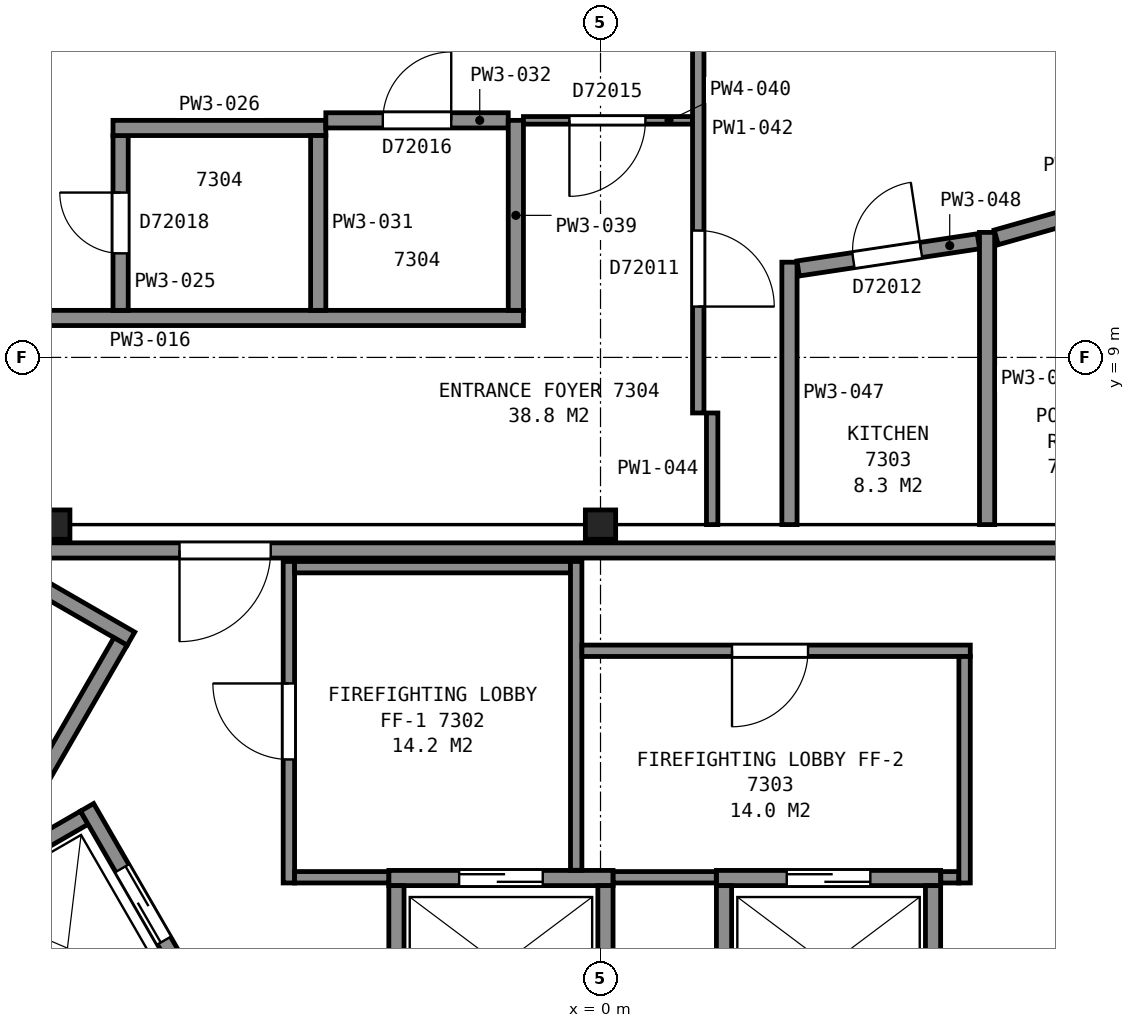
"""IFC4 building model, lengths in metres.
Left out: names, types, materials, properties, quantities, classifications, styles, units other than length and angle.
Written with IfcOpenShell. Run it as: python <this file> out.ifc"""

import sys

from ifc_helpers import new_model, si_unit, direction, frame, frame_2d, origin, origin_2d, place, context, subcontext, project, spatial, rectangle, i_section, extrude, element, fill, save


model = new_model("IFC4")
c1 = context("Model", 3, precision=1e-05, world=origin(), true_north=direction((0.0, 1.0)))
c2 = subcontext(c1, "Body", "Model", "MODEL_VIEW")
j1 = project(units=[si_unit("LENGTHUNIT", "METRE"), si_unit("PLANEANGLEUNIT", "RADIAN")], contexts=[c1])
p1 = place(None, origin())
s1 = spatial("IfcSite", under=j1, at=p1, CompositionType="ELEMENT")
p2 = place(p1, origin())
s2 = spatial("IfcBuilding", under=s1, at=p2, CompositionType="ELEMENT")
p3 = place(p2, frame((0.0, 0.0, 289.9)))
s3 = spatial("IfcBuildingStorey", under=s2, at=p3, CompositionType="ELEMENT", Elevation=289.9)
for number, where, z_axis, x_axis in (
    (1, (0.0, 6.8, 0.0), (0.0, 0.0, 1.0), (1.0, 0.0, 0.0)),
    (2, (-7.18, 6.8, 0.0), (0.0, 0.0, 1.0), (1.0, 0.0, 0.0)),
):
    element("IfcColumn", number, at=place(p3, frame(where, z_axis=z_axis, x_axis=x_axis)), inside=s3, PredefinedType="COLUMN", context=c2, shape_type="SweptSolid", body=[
        extrude(i_section(OverallWidth=0.399, OverallDepth=0.386, WebThickness=0.021, FlangeThickness=0.033, FilletRadius=0.015, at=origin_2d()), origin(), (0.0, 0.0, 1.0), 3.7),
    ])
p4 = place(p3, frame((-6.178, 5.299, 0.0), z_axis=(0.0, 0.0, 1.0), x_axis=(-0.866033125095, 0.499986626058, 0.0)))
e3 = element("IfcWall", 3, at=p4, inside=s3, PredefinedType="PARTITIONING", context=c2, shape_type="SweptSolid", body=[
    extrude(rectangle(XDim=7.2, YDim=0.2, at=frame_2d((3.6, 0.0))), origin(), (0.0, 0.0, 1.0), 3.45),
])
p5 = place(p3, frame((-6.315, 5.262, 0.0), z_axis=(0.0, 0.0, 1.0), x_axis=(-0.500049511043, -0.865996816683, 0.0)))
e4 = element("IfcWall", 4, at=p5, inside=s3, PredefinedType="PARTITIONING", context=c2, shape_type="SweptSolid", body=[
    extrude(rectangle(XDim=2.8, YDim=0.2, at=frame_2d((1.4, 0.0))), origin(), (0.0, 0.0, 1.0), 3.45),
])
p6 = place(p3, frame((-2.785, 2.15, 0.0), z_axis=(0.0, 0.0, 1.0), x_axis=(1.0, 0.0, 0.0)))
e5 = element("IfcWall", 5, at=p6, inside=s3, PredefinedType="PARTITIONING", context=c2, shape_type="SweptSolid", body=[
    extrude(rectangle(XDim=2.95, YDim=0.2, at=frame_2d((1.475, 0.0))), origin(), (0.0, 0.0, 1.0), 3.7),
])
p7 = place(p6, frame((0.925, 0.0, 0.0)))
e6 = element("IfcOpeningElement", 6, at=p7, cuts=e5, PredefinedType="OPENING", context=c2, shape_type="SweptSolid", body=[
    extrude(rectangle(XDim=1.1, YDim=2.1, at=frame_2d((0.55, 1.05))), frame((0.0, 0.11, 0.0), z_axis=(0.0, -1.0, 0.0), x_axis=(1.0, 0.0, 0.0)), (0.0, 0.0, 1.0), 0.22),
])
p8 = place(p3, frame((1.525, 2.15, 0.0), z_axis=(0.0, 0.0, 1.0), x_axis=(1.0, 0.0, 0.0)))
e7 = element("IfcWall", 7, at=p8, inside=s3, PredefinedType="PARTITIONING", context=c2, shape_type="SweptSolid", body=[
    extrude(rectangle(XDim=2.95, YDim=0.2, at=frame_2d((1.475, 0.0))), origin(), (0.0, 0.0, 1.0), 3.7),
])
p9 = place(p8, frame((0.925, 0.0, 0.0)))
e8 = element("IfcOpeningElement", 8, at=p9, cuts=e7, PredefinedType="OPENING", context=c2, shape_type="SweptSolid", body=[
    extrude(rectangle(XDim=1.1, YDim=2.1, at=frame_2d((0.55, 1.05))), frame((0.0, 0.11, 0.0), z_axis=(0.0, -1.0, 0.0), x_axis=(1.0, 0.0, 0.0)), (0.0, 0.0, 1.0), 0.22),
])
for number, where, z_axis, x_axis in (
    (9, (-8.48, 1.969, 0.0), (0.0, 0.0, 1.0), (0.866, 0.5, 0.0)),
    (10, (4.375, 0.1, 0.0), (0.0, 0.0, 1.0), (0.0, 1.0, 0.0)),
    (11, (1.625, 0.1, 0.0), (0.0, 0.0, 1.0), (0.0, 1.0, 0.0)),
    (12, (0.065, 0.1, 0.0), (0.0, 0.0, 1.0), (0.0, 1.0, 0.0)),
    (13, (-2.685, 0.1, 0.0), (0.0, 0.0, 1.0), (0.0, 1.0, 0.0)),
):
    element("IfcWall", number, at=place(p3, frame(where, z_axis=z_axis, x_axis=x_axis)), inside=s3, PredefinedType="PARTITIONING", context=c2, shape_type="SweptSolid", body=[
        extrude(rectangle(XDim=1.95, YDim=0.2, at=frame_2d((0.975, 0.0))), origin(), (0.0, 0.0, 1.0), 3.7),
    ])
p10 = place(p3, frame((-5.28, 0.525, 0.0), z_axis=(0.0, 0.0, 1.0), x_axis=(-0.500037662692, 0.866003658127, 0.0)))
e14 = element("IfcWall", 14, at=p10, inside=s3, PredefinedType="PARTITIONING", context=c2, shape_type="SweptSolid", body=[
    extrude(rectangle(XDim=2.95, YDim=0.2, at=frame_2d((1.475, 0.0))), origin(), (0.0, 0.0, 1.0), 3.7),
])
p11 = place(p10, frame((0.925, 0.0, 0.0)))
e15 = element("IfcOpeningElement", 15, at=p11, cuts=e14, PredefinedType="OPENING", context=c2, shape_type="SweptSolid", body=[
    extrude(rectangle(XDim=1.1, YDim=2.1, at=frame_2d((0.55, 1.05))), frame((0.0, 0.11, 0.0), z_axis=(0.0, -1.0, 0.0), x_axis=(1.0, 0.0, 0.0)), (0.0, 0.0, 1.0), 0.22),
])
p12 = place(p3, frame((-7.142, -0.55, 0.0), z_axis=(0.0, 0.0, 1.0), x_axis=(-0.49997559174, 0.866039495442, 0.0)))
e16 = element("IfcWall", 16, at=p12, inside=s3, PredefinedType="PARTITIONING", context=c2, shape_type="SweptSolid", body=[
    extrude(rectangle(XDim=2.95, YDim=0.2, at=frame_2d((1.475, 0.0))), origin(), (0.0, 0.0, 1.0), 3.7),
])
p13 = place(p3, frame((7.829, 6.46, 0.0), z_axis=(0.0, 0.0, 1.0), x_axis=(-1.0, 0.0, 0.0)))
e17 = element("IfcWall", 17, at=p13, inside=s3, PredefinedType="PARTITIONING", context=c2, shape_type="SweptSolid", body=[
    extrude(rectangle(XDim=15.658, YDim=0.2, at=frame_2d((7.829, 0.0))), origin(), (0.0, 0.0, 1.0), 3.45),
])
p14 = place(p13, frame((12.168, 0.0, 0.0)))
e18 = element("IfcOpeningElement", 18, at=p14, cuts=e17, PredefinedType="OPENING", context=c2, shape_type="SweptSolid", body=[
    extrude(rectangle(XDim=1.2, YDim=2.1, at=frame_2d((0.6, 1.05))), frame((0.0, 0.11, 0.0), z_axis=(0.0, -1.0, 0.0), x_axis=(1.0, 0.0, 0.0)), (0.0, 0.0, 1.0), 0.22),
])
p15 = place(p3, frame((-4.1, 2.085, 0.0), z_axis=(0.0, 0.0, 1.0), x_axis=(0.0, 1.0, 0.0)))
e19 = element("IfcWall", 19, at=p15, inside=s3, PredefinedType="PARTITIONING", context=c2, shape_type="SweptSolid", body=[
    extrude(rectangle(XDim=4.23, YDim=0.15, at=frame_2d((2.115, 0.0))), origin(), (0.0, 0.0, 1.0), 3.45),
])
p16 = place(p15, frame((1.625, 0.0, 0.0)))
e20 = element("IfcOpeningElement", 20, at=p16, cuts=e19, PredefinedType="OPENING", context=c2, shape_type="SweptSolid", body=[
    extrude(rectangle(XDim=1.0, YDim=2.1, at=frame_2d((0.5, 1.05))), frame((0.0, 0.085, 0.0), z_axis=(0.0, -1.0, 0.0), x_axis=(1.0, 0.0, 0.0)), (0.0, 0.0, 1.0), 0.17),
])
p17 = place(p3, frame((-4.025, 2.16, 0.0), z_axis=(0.0, 0.0, 1.0), x_axis=(1.0, 0.0, 0.0)))
e21 = element("IfcWall", 21, at=p17, inside=s3, PredefinedType="PARTITIONING", context=c2, shape_type="SweptSolid", body=[
    extrude(rectangle(XDim=1.238, YDim=0.15, at=frame_2d((0.619, 0.0))), origin(), (0.0, 0.0, 1.0), 3.45),
])
p18 = place(p3, frame((-4.025, 6.24, 0.0), z_axis=(0.0, 0.0, 1.0), x_axis=(1.0, 0.0, 0.0)))
e22 = element("IfcWall", 22, at=p18, inside=s3, PredefinedType="PARTITIONING", context=c2, shape_type="SweptSolid", body=[
    extrude(rectangle(XDim=3.63, YDim=0.15, at=frame_2d((1.815, 0.0))), origin(), (0.0, 0.0, 1.0), 3.45),
])
p19 = place(p3, frame((-0.32, 2.252, 0.0), z_axis=(0.0, 0.0, 1.0), x_axis=(0.0, 1.0, 0.0)))
e23 = element("IfcWall", 23, at=p19, inside=s3, PredefinedType="PARTITIONING", context=c2, shape_type="SweptSolid", body=[
    extrude(rectangle(XDim=4.063, YDim=0.15, at=frame_2d((2.031, 0.0))), origin(), (0.0, 0.0, 1.0), 3.45),
])
p20 = place(p3, frame((-0.245, 5.14, 0.0), z_axis=(0.0, 0.0, 1.0), x_axis=(1.0, 0.0, 0.0)))
e24 = element("IfcWall", 24, at=p20, inside=s3, PredefinedType="PARTITIONING", context=c2, shape_type="SweptSolid", body=[
    extrude(rectangle(XDim=5.11, YDim=0.15, at=frame_2d((2.555, 0.0))), origin(), (0.0, 0.0, 1.0), 3.45),
])
p21 = place(p20, frame((1.975, 0.0, 0.0)))
e25 = element("IfcOpeningElement", 25, at=p21, cuts=e24, PredefinedType="OPENING", context=c2, shape_type="SweptSolid", body=[
    extrude(rectangle(XDim=1.0, YDim=2.1, at=frame_2d((0.5, 1.05))), frame((0.0, 0.085, 0.0), z_axis=(0.0, -1.0, 0.0), x_axis=(1.0, 0.0, 0.0)), (0.0, 0.0, 1.0), 0.17),
])
p22 = place(p3, frame((0.167, 2.16, 0.0), z_axis=(0.0, 0.0, 1.0), x_axis=(1.0, 0.0, 0.0)))
e26 = element("IfcWall", 26, at=p22, inside=s3, PredefinedType="PARTITIONING", context=c2, shape_type="SweptSolid", body=[
    extrude(rectangle(XDim=1.356, YDim=0.15, at=frame_2d((0.678, 0.0))), origin(), (0.0, 0.0, 1.0), 3.45),
])
p23 = place(p3, frame((3.828, -6.29, 0.0), z_axis=(0.0, 0.0, 1.0), x_axis=(0.499979739078, 0.866037101117, 0.0)))
e27 = element("IfcWall", 27, at=p23, inside=s3, PredefinedType="PARTITIONING", context=c2, shape_type="SweptSolid", body=[
    extrude(rectangle(XDim=11.363, YDim=0.2, at=frame_2d((5.681, 0.0))), origin(), (0.0, 0.0, 1.0), 3.45),
])
p24 = place(p23, frame((0.55, 0.0, 0.0)))
e28 = element("IfcOpeningElement", 28, at=p24, cuts=e27, PredefinedType="OPENING", context=c2, shape_type="SweptSolid", body=[
    extrude(rectangle(XDim=1.2, YDim=2.1, at=frame_2d((0.6, 1.05))), frame((0.0, 0.11, 0.0), z_axis=(0.0, -1.0, 0.0), x_axis=(1.0, 0.0, 0.0)), (0.0, 0.0, 1.0), 0.22),
])
p25 = place(p3, frame((4.477, 2.16, 0.0), z_axis=(0.0, 0.0, 1.0), x_axis=(1.0, 0.0, 0.0)))
e29 = element("IfcWall", 29, at=p25, inside=s3, PredefinedType="PARTITIONING", context=c2, shape_type="SweptSolid", body=[
    extrude(rectangle(XDim=0.238, YDim=0.15, at=frame_2d((0.119, 0.0))), origin(), (0.0, 0.0, 1.0), 3.45),
])
p26 = place(p3, frame((4.79, 2.085, 0.0), z_axis=(0.0, 0.0, 1.0), x_axis=(0.0, 1.0, 0.0)))
e30 = element("IfcWall", 30, at=p26, inside=s3, PredefinedType="PARTITIONING", context=c2, shape_type="SweptSolid", body=[
    extrude(rectangle(XDim=2.98, YDim=0.15, at=frame_2d((1.49, 0.0))), origin(), (0.0, 0.0, 1.0), 3.45),
])
p27 = place(p3, frame((-10.838, 9.519, 0.0), z_axis=(0.0, 0.0, 1.0), x_axis=(1.0, 0.0, 0.0)))
e31 = element("IfcWall", 31, at=p27, inside=s3, PredefinedType="PARTITIONING", context=c2, shape_type="SweptSolid", body=[
    extrude(rectangle(XDim=9.824, YDim=0.2, at=frame_2d((4.912, 0.0))), origin(), (0.0, 0.0, 1.0), 2.723),
])
p28 = place(p3, frame((-6.314, 11.919, 0.0), z_axis=(0.0, 0.0, 1.0), x_axis=(0.0, -1.0, 0.0)))
e32 = element("IfcWall", 32, at=p28, inside=s3, PredefinedType="PARTITIONING", context=c2, shape_type="SweptSolid", body=[
    extrude(rectangle(XDim=2.3, YDim=0.2, at=frame_2d((1.15, 0.0))), origin(), (0.0, 0.0, 1.0), 2.723),
])
p29 = place(p28, frame((0.75, 0.0, 0.0)))
e33 = element("IfcOpeningElement", 33, at=p29, cuts=e32, PredefinedType="OPENING", context=c2, shape_type="SweptSolid", body=[
    extrude(rectangle(XDim=0.8, YDim=2.1, at=frame_2d((0.4, 1.05))), frame((0.0, 0.11, 0.0), z_axis=(0.0, -1.0, 0.0), x_axis=(1.0, 0.0, 0.0)), (0.0, 0.0, 1.0), 0.22),
])
p30 = place(p3, frame((-6.414, 12.019, 0.0), z_axis=(0.0, 0.0, 1.0), x_axis=(1.0, 0.0, 0.0)))
e34 = element("IfcWall", 34, at=p30, inside=s3, PredefinedType="PARTITIONING", context=c2, shape_type="SweptSolid", body=[
    extrude(rectangle(XDim=2.8, YDim=0.2, at=frame_2d((1.4, 0.0))), origin(), (0.0, 0.0, 1.0), 2.723),
])
p31 = place(p3, frame((-3.714, 9.619, 0.0), z_axis=(0.0, 0.0, 1.0), x_axis=(0.0, 1.0, 0.0)))
e35 = element("IfcWall", 35, at=p31, inside=s3, PredefinedType="PARTITIONING", context=c2, shape_type="SweptSolid", body=[
    extrude(rectangle(XDim=2.3, YDim=0.2, at=frame_2d((1.15, 0.0))), origin(), (0.0, 0.0, 1.0), 2.723),
])
p32 = place(p3, frame((-1.214, 12.119, 0.0), z_axis=(0.0, 0.0, 1.0), x_axis=(-1.0, 0.0, 0.0)))
e36 = element("IfcWall", 36, at=p32, inside=s3, PredefinedType="PARTITIONING", context=c2, shape_type="SweptSolid", body=[
    extrude(rectangle(XDim=2.4, YDim=0.2, at=frame_2d((1.2, 0.0))), origin(), (0.0, 0.0, 1.0), 2.723),
])
p33 = place(p32, frame((0.75, 0.0, 0.0)))
e37 = element("IfcOpeningElement", 37, at=p33, cuts=e36, PredefinedType="OPENING", context=c2, shape_type="SweptSolid", body=[
    extrude(rectangle(XDim=0.9, YDim=2.1, at=frame_2d((0.45, 1.05))), frame((0.0, 0.11, 0.0), z_axis=(0.0, -1.0, 0.0), x_axis=(1.0, 0.0, 0.0)), (0.0, 0.0, 1.0), 0.22),
])
p34 = place(p3, frame((-1.114, 9.619, 0.0), z_axis=(0.0, 0.0, 1.0), x_axis=(0.0, 1.0, 0.0)))
e38 = element("IfcWall", 38, at=p34, inside=s3, PredefinedType="PARTITIONING", context=c2, shape_type="SweptSolid", body=[
    extrude(rectangle(XDim=2.5, YDim=0.2, at=frame_2d((1.25, 0.0))), origin(), (0.0, 0.0, 1.0), 2.723),
])
p35 = place(p3, frame((-1.014, 12.119, 0.0), z_axis=(0.0, 0.0, 1.0), x_axis=(1.0, 0.0, 0.0)))
e39 = element("IfcWall", 39, at=p35, inside=s3, PredefinedType="PARTITIONING", context=c2, shape_type="SweptSolid", body=[
    extrude(rectangle(XDim=2.225, YDim=0.1, at=frame_2d((1.112, 0.0))), origin(), (0.0, 0.0, 1.0), 2.723),
])
p36 = place(p35, frame((0.605, 0.0, 0.0)))
e40 = element("IfcOpeningElement", 40, at=p36, cuts=e39, PredefinedType="OPENING", context=c2, shape_type="SweptSolid", body=[
    extrude(rectangle(XDim=1.0, YDim=2.1, at=frame_2d((0.5, 1.05))), frame((0.0, 0.06, 0.0), z_axis=(0.0, -1.0, 0.0), x_axis=(1.0, 0.0, 0.0)), (0.0, 0.0, 1.0), 0.12),
])
p37 = place(p3, frame((1.286, 13.351, 0.0), z_axis=(0.0, 0.0, 1.0), x_axis=(0.0, -1.0, 0.0)))
e41 = element("IfcWall", 41, at=p37, inside=s3, PredefinedType="PARTITIONING", context=c2, shape_type="SweptSolid", body=[
    extrude(rectangle(XDim=5.082, YDim=0.15, at=frame_2d((2.541, 0.0))), origin(), (0.0, 0.0, 1.0), 2.723),
])
p38 = place(p37, frame((2.682, 0.0, 0.0)))
e42 = element("IfcOpeningElement", 42, at=p38, cuts=e41, PredefinedType="OPENING", context=c2, shape_type="SweptSolid", body=[
    extrude(rectangle(XDim=1.0, YDim=2.1, at=frame_2d((0.5, 1.05))), frame((0.0, 0.085, 0.0), z_axis=(0.0, -1.0, 0.0), x_axis=(1.0, 0.0, 0.0)), (0.0, 0.0, 1.0), 0.17),
])
p39 = place(p3, frame((1.469, 6.8, 0.0), z_axis=(0.0, 0.0, 1.0), x_axis=(0.0, 1.0, 0.0)))
e43 = element("IfcWall", 43, at=p39, inside=s3, PredefinedType="PARTITIONING", context=c2, shape_type="SweptSolid", body=[
    extrude(rectangle(XDim=1.469, YDim=0.15, at=frame_2d((0.734, 0.0))), origin(), (0.0, 0.0, 1.0), 2.723),
])
p40 = place(p3, frame((2.486, 6.8, 0.0), z_axis=(0.0, 0.0, 1.0), x_axis=(0.0, 1.0, 0.0)))
e44 = element("IfcWall", 44, at=p40, inside=s3, PredefinedType="PARTITIONING", context=c2, shape_type="SweptSolid", body=[
    extrude(rectangle(XDim=3.453, YDim=0.2, at=frame_2d((1.727, 0.0))), origin(), (0.0, 0.0, 1.0), 2.723),
])
p41 = place(p3, frame((4.972, 10.528, 0.0), z_axis=(0.0, 0.0, 1.0), x_axis=(-0.988827119235, -0.149066858374, 0.0)))
e45 = element("IfcWall", 45, at=p41, inside=s3, PredefinedType="PARTITIONING", context=c2, shape_type="SweptSolid", body=[
    extrude(rectangle(XDim=2.399, YDim=0.2, at=frame_2d((1.2, 0.0))), origin(), (0.0, 0.0, 1.0), 2.723),
])
p42 = place(p41, frame((0.764, 0.0, 0.0)))
e46 = element("IfcOpeningElement", 46, at=p42, cuts=e45, PredefinedType="OPENING", context=c2, shape_type="SweptSolid", body=[
    extrude(rectangle(XDim=0.9, YDim=2.1, at=frame_2d((0.45, 1.05))), frame((0.0, 0.11, 0.0), z_axis=(0.0, -1.0, 0.0), x_axis=(1.0, 0.0, 0.0)), (0.0, 0.0, 1.0), 0.22),
])
p43 = place(p3, frame((5.086, 6.8, 0.0), z_axis=(0.0, 0.0, 1.0), x_axis=(0.0, 1.0, 0.0)))
e47 = element("IfcWall", 47, at=p43, inside=s3, PredefinedType="PARTITIONING", context=c2, shape_type="SweptSolid", body=[
    extrude(rectangle(XDim=3.845, YDim=0.2, at=frame_2d((1.922, 0.0))), origin(), (0.0, 0.0, 1.0), 2.723),
])
p44 = place(p3, frame((5.206, 10.579, 0.0), z_axis=(0.0, 0.0, 1.0), x_axis=(0.962043687615, 0.272895480212, 0.0)))
e48 = element("IfcWall", 48, at=p44, inside=s3, PredefinedType="PARTITIONING", context=c2, shape_type="SweptSolid", body=[
    extrude(rectangle(XDim=2.032, YDim=0.2, at=frame_2d((1.016, 0.0))), origin(), (0.0, 0.0, 1.0), 2.723),
])
p45 = place(p7, origin())
e49 = element("IfcDoor", 49, at=p45, inside=s3, OperationType="SLIDING_TO_LEFT", PredefinedType="DOOR", context=c2, shape_type="SweptSolid", body=[
    extrude(rectangle(XDim=1.1, YDim=2.1, at=frame_2d((0.55, 1.05))), frame((0.0, 0.025, 0.0), z_axis=(0.0, -1.0, 0.0), x_axis=(1.0, 0.0, 0.0)), (0.0, 0.0, 1.0), 0.05),
])
fill(e6, e49)
p46 = place(p9, origin())
e50 = element("IfcDoor", 50, at=p46, inside=s3, OperationType="SLIDING_TO_RIGHT", PredefinedType="DOOR", context=c2, shape_type="SweptSolid", body=[
    extrude(rectangle(XDim=1.1, YDim=2.1, at=frame_2d((0.55, 1.05))), frame((0.0, 0.025, 0.0), z_axis=(0.0, -1.0, 0.0), x_axis=(1.0, 0.0, 0.0)), (0.0, 0.0, 1.0), 0.05),
])
fill(e8, e50)
p47 = place(p11, origin())
e51 = element("IfcDoor", 51, at=p47, inside=s3, OperationType="SLIDING_TO_LEFT", PredefinedType="DOOR", context=c2, shape_type="SweptSolid", body=[
    extrude(rectangle(XDim=1.1, YDim=2.1, at=frame_2d((0.55, 1.05))), frame((0.0, 0.025, 0.0), z_axis=(0.0, -1.0, 0.0), x_axis=(1.0, 0.0, 0.0)), (0.0, 0.0, 1.0), 0.05),
])
fill(e15, e51)
p48 = place(p14, origin())
e52 = element("IfcDoor", 52, at=p48, inside=s3, OperationType="SINGLE_SWING_RIGHT", PredefinedType="DOOR", context=c2, shape_type="SweptSolid", body=[
    extrude(rectangle(XDim=1.2, YDim=2.1, at=frame_2d((0.6, 1.05))), frame((0.0, 0.025, 0.0), z_axis=(0.0, -1.0, 0.0), x_axis=(1.0, 0.0, 0.0)), (0.0, 0.0, 1.0), 0.05),
])
fill(e18, e52)
p49 = place(p16, origin())
e53 = element("IfcDoor", 53, at=p49, inside=s3, OperationType="SINGLE_SWING_RIGHT", PredefinedType="DOOR", context=c2, shape_type="SweptSolid", body=[
    extrude(rectangle(XDim=1.0, YDim=2.1, at=frame_2d((0.5, 1.05))), frame((0.0, 0.025, 0.0), z_axis=(0.0, -1.0, 0.0), x_axis=(1.0, 0.0, 0.0)), (0.0, 0.0, 1.0), 0.05),
])
fill(e20, e53)
p50 = place(p21, origin())
e54 = element("IfcDoor", 54, at=p50, inside=s3, OperationType="SINGLE_SWING_LEFT", PredefinedType="DOOR", context=c2, shape_type="SweptSolid", body=[
    extrude(rectangle(XDim=1.0, YDim=2.1, at=frame_2d((0.5, 1.05))), frame((0.0, 0.025, 0.0), z_axis=(0.0, -1.0, 0.0), x_axis=(1.0, 0.0, 0.0)), (0.0, 0.0, 1.0), 0.05),
])
fill(e25, e54)
p51 = place(p29, origin())
e55 = element("IfcDoor", 55, at=p51, inside=s3, OperationType="SINGLE_SWING_LEFT", PredefinedType="DOOR", context=c2, shape_type="SweptSolid", body=[
    extrude(rectangle(XDim=0.8, YDim=2.1, at=frame_2d((0.4, 1.05))), frame((0.0, 0.025, 0.0), z_axis=(0.0, -1.0, 0.0), x_axis=(1.0, 0.0, 0.0)), (0.0, 0.0, 1.0), 0.05),
])
fill(e33, e55)
p52 = place(p33, origin())
e56 = element("IfcDoor", 56, at=p52, inside=s3, OperationType="SINGLE_SWING_LEFT", PredefinedType="DOOR", context=c2, shape_type="SweptSolid", body=[
    extrude(rectangle(XDim=0.9, YDim=2.1, at=frame_2d((0.45, 1.05))), frame((0.0, 0.025, 0.0), z_axis=(0.0, -1.0, 0.0), x_axis=(1.0, 0.0, 0.0)), (0.0, 0.0, 1.0), 0.05),
])
fill(e37, e56)
p53 = place(p36, origin())
e57 = element("IfcDoor", 57, at=p53, inside=s3, OperationType="SINGLE_SWING_LEFT", PredefinedType="DOOR", context=c2, shape_type="SweptSolid", body=[
    extrude(rectangle(XDim=1.0, YDim=2.1, at=frame_2d((0.5, 1.05))), frame((0.0, 0.025, 0.0), z_axis=(0.0, -1.0, 0.0), x_axis=(1.0, 0.0, 0.0)), (0.0, 0.0, 1.0), 0.05),
])
fill(e40, e57)
p54 = place(p38, origin())
e58 = element("IfcDoor", 58, at=p54, inside=s3, OperationType="SINGLE_SWING_RIGHT", PredefinedType="DOOR", context=c2, shape_type="SweptSolid", body=[
    extrude(rectangle(XDim=1.0, YDim=2.1, at=frame_2d((0.5, 1.05))), frame((0.0, 0.025, 0.0), z_axis=(0.0, -1.0, 0.0), x_axis=(1.0, 0.0, 0.0)), (0.0, 0.0, 1.0), 0.05),
])
fill(e42, e58)
p55 = place(p42, origin())
e59 = element("IfcDoor", 59, at=p55, inside=s3, OperationType="SINGLE_SWING_LEFT", PredefinedType="DOOR", context=c2, shape_type="SweptSolid", body=[
    extrude(rectangle(XDim=0.9, YDim=2.1, at=frame_2d((0.45, 1.05))), frame((0.0, 0.025, 0.0), z_axis=(0.0, -1.0, 0.0), x_axis=(1.0, 0.0, 0.0)), (0.0, 0.0, 1.0), 0.05),
])
fill(e46, e59)
save(model, sys.argv[1])
